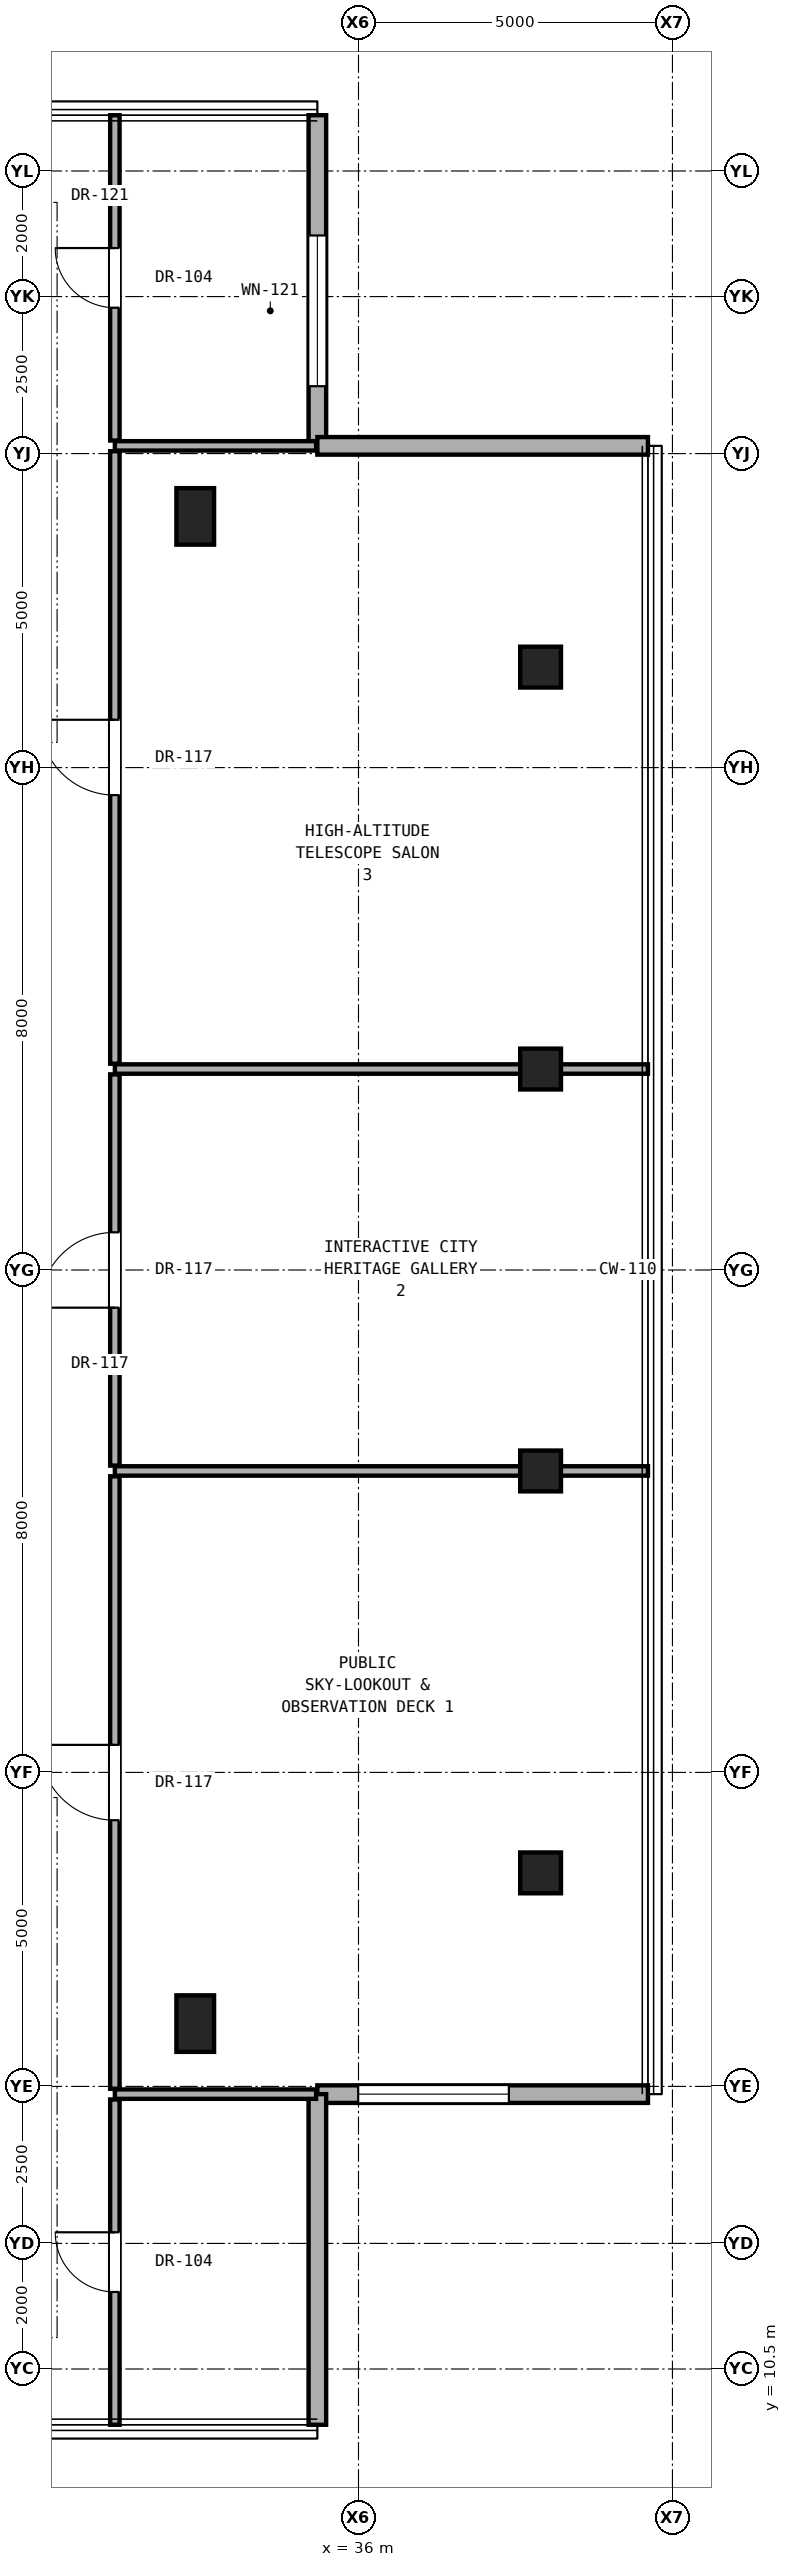
"""IFC4 building model, lengths in metres.
Left out: names, types, materials, properties, quantities, classifications, styles, units other than length and angle.
Written with IfcOpenShell. Run it as: python <this file> out.ifc"""

import sys

from ifc_helpers import new_model, si_unit, direction, frame, frame_2d, origin, origin_2d, place, context, subcontext, project, spatial, rectangle, hollow_rectangle, extrude, element, fill, save


model = new_model("IFC4")
c1 = context("Model", 3, precision=1e-05, world=origin(), true_north=direction((0.0, 1.0)))
c2 = subcontext(c1, "Body", "Model", "MODEL_VIEW")
j1 = project(units=[si_unit("LENGTHUNIT", "METRE"), si_unit("PLANEANGLEUNIT", "RADIAN")], contexts=[c1])
p1 = place(None, origin())
s1 = spatial("IfcSite", under=j1, at=p1, CompositionType="ELEMENT")
p2 = place(p1, origin())
s2 = spatial("IfcBuilding", under=s1, at=p2, CompositionType="ELEMENT")
p3 = place(p2, frame((0.0, 0.0, 252.7)))
s3 = spatial("IfcBuildingStorey", under=s2, at=p3, CompositionType="ELEMENT", Elevation=252.7)
for number, where, z_axis, x_axis in (
    (1, (38.9, 18.4, 0.0), (0.0, 0.0, 1.0), (1.0, 0.0, 0.0)),
    (2, (38.9, 24.8, 0.0), (0.0, 0.0, 1.0), (1.0, 0.0, 0.0)),
    (3, (38.9, 31.2, 0.0), (0.0, 0.0, 1.0), (1.0, 0.0, 0.0)),
    (4, (38.9, 37.6, 0.0), (0.0, 0.0, 1.0), (1.0, 0.0, 0.0)),
):
    element("IfcColumn", number, at=place(p3, frame(where, z_axis=z_axis, x_axis=x_axis)), inside=s3, PredefinedType="COLUMN", context=c2, shape_type="SweptSolid", body=[
        extrude(hollow_rectangle(XDim=0.65, YDim=0.65, WallThickness=0.036, at=origin_2d()), origin(), (0.0, 0.0, 1.0), 3.6),
    ])
for number, where, z_axis, x_axis in (
    (5, (33.4, 16.0, 0.0), (0.0, 0.0, 1.0), (1.0, 0.0, 0.0)),
    (6, (33.4, 40.0, 0.0), (0.0, 0.0, 1.0), (1.0, 0.0, 0.0)),
):
    element("IfcColumn", number, at=place(p3, frame(where, z_axis=z_axis, x_axis=x_axis)), inside=s3, PredefinedType="PILASTER", context=c2, shape_type="SweptSolid", body=[
        extrude(rectangle(XDim=0.6, YDim=0.9, at=origin_2d()), origin(), (0.0, 0.0, 1.0), 3.6),
    ])
p4 = place(p3, frame((35.345, 41.123, 0.0), z_axis=(0.0, 0.0, 1.0), x_axis=(0.0, 1.0, 0.0)))
e7 = element("IfcWall", 7, at=p4, inside=s3, PredefinedType="SOLIDWALL", context=c2, shape_type="SweptSolid", body=[
    extrude(rectangle(XDim=5.265, YDim=0.28, at=frame_2d((2.632, 0.0))), origin(), (0.0, 0.0, 1.0), 3.38),
])
p5 = place(p4, frame((0.95, 0.0, 0.85)))
e8 = element("IfcOpeningElement", 8, at=p5, cuts=e7, PredefinedType="OPENING", context=c2, shape_type="SweptSolid", body=[
    extrude(rectangle(XDim=2.4, YDim=2.35, at=frame_2d((1.2, 1.175))), frame((0.0, 0.15, 0.0), z_axis=(0.0, -1.0, 0.0), x_axis=(1.0, 0.0, 0.0)), (0.0, 0.0, 1.0), 0.3),
])
p6 = place(p3, frame((35.345, 14.877, 0.0), z_axis=(0.0, 0.0, 1.0), x_axis=(1.0, 0.0, 0.0)))
e9 = element("IfcWall", 9, at=p6, inside=s3, PredefinedType="SOLIDWALL", context=c2, shape_type="SweptSolid", body=[
    extrude(rectangle(XDim=5.265, YDim=0.28, at=frame_2d((2.633, 0.0))), origin(), (0.0, 0.0, 1.0), 3.38),
])
p7 = place(p6, frame((0.65, 0.0, 0.85)))
e10 = element("IfcOpeningElement", 10, at=p7, cuts=e9, PredefinedType="OPENING", context=c2, shape_type="SweptSolid", body=[
    extrude(rectangle(XDim=2.4, YDim=2.35, at=frame_2d((1.2, 1.175))), frame((0.0, 0.15, 0.0), z_axis=(0.0, -1.0, 0.0), x_axis=(1.0, 0.0, 0.0)), (0.0, 0.0, 1.0), 0.3),
])
p8 = place(p3, frame((35.345, 9.612, 0.0), z_axis=(0.0, 0.0, 1.0), x_axis=(0.0, 1.0, 0.0)))
e11 = element("IfcWall", 11, at=p8, inside=s3, PredefinedType="SOLIDWALL", context=c2, shape_type="SweptSolid", body=[
    extrude(rectangle(XDim=5.265, YDim=0.28, at=frame_2d((2.632, 0.0))), origin(), (0.0, 0.0, 1.0), 3.38),
])
p9 = place(p3, frame((40.61, 41.123, 0.0), z_axis=(0.0, 0.0, 1.0), x_axis=(-1.0, 0.0, 0.0)))
e12 = element("IfcWall", 12, at=p9, inside=s3, PredefinedType="SOLIDWALL", context=c2, shape_type="SweptSolid", body=[
    extrude(rectangle(XDim=5.265, YDim=0.28, at=frame_2d((2.633, 0.0))), origin(), (0.0, 0.0, 1.0), 3.38),
])
p10 = place(p3, frame((32.12, 14.877, 0.0), z_axis=(0.0, 0.0, 1.0), x_axis=(1.0, 0.0, 0.0)))
e13 = element("IfcWall", 13, at=p10, inside=s3, PredefinedType="PARTITIONING", context=c2, shape_type="SweptSolid", body=[
    extrude(rectangle(XDim=3.205, YDim=0.15, at=frame_2d((1.603, 0.0))), origin(), (0.0, 0.0, 1.0), 3.4),
])
for number, where, z_axis, x_axis in (
    (14, (32.12, 24.8, 0.0), (0.0, 0.0, 1.0), (1.0, 0.0, 0.0)),
    (15, (32.12, 31.2, 0.0), (0.0, 0.0, 1.0), (1.0, 0.0, 0.0)),
):
    element("IfcWall", number, at=place(p3, frame(where, z_axis=z_axis, x_axis=x_axis)), inside=s3, PredefinedType="PARTITIONING", context=c2, shape_type="SweptSolid", body=[
        extrude(rectangle(XDim=8.49, YDim=0.15, at=frame_2d((4.245, 0.0))), origin(), (0.0, 0.0, 1.0), 2.619),
    ])
p11 = place(p3, frame((32.12, 41.123, 0.0), z_axis=(0.0, 0.0, 1.0), x_axis=(1.0, 0.0, 0.0)))
e16 = element("IfcWall", 16, at=p11, inside=s3, PredefinedType="PARTITIONING", context=c2, shape_type="SweptSolid", body=[
    extrude(rectangle(XDim=3.205, YDim=0.15, at=frame_2d((1.603, 0.0))), origin(), (0.0, 0.0, 1.0), 3.4),
])
p12 = place(p3, frame((32.12, 9.612, 0.0), z_axis=(0.0, 0.0, 1.0), x_axis=(0.0, 1.0, 0.0)))
e17 = element("IfcWall", 17, at=p12, inside=s3, PredefinedType="PARTITIONING", context=c2, shape_type="SweptSolid", body=[
    extrude(rectangle(XDim=5.18, YDim=0.15, at=frame_2d((2.59, 0.0))), origin(), (0.0, 0.0, 1.0), 3.4),
])
p13 = place(p12, frame((2.115, 0.0, 0.0)))
e18 = element("IfcOpeningElement", 18, at=p13, cuts=e17, PredefinedType="OPENING", context=c2, shape_type="SweptSolid", body=[
    extrude(rectangle(XDim=0.95, YDim=2.15, at=frame_2d((0.475, 1.075))), frame((0.0, 0.085, 0.0), z_axis=(0.0, -1.0, 0.0), x_axis=(1.0, 0.0, 0.0)), (0.0, 0.0, 1.0), 0.17),
])
p14 = place(p3, frame((32.12, 14.962, 0.0), z_axis=(0.0, 0.0, 1.0), x_axis=(0.0, 1.0, 0.0)))
e19 = element("IfcWall", 19, at=p14, inside=s3, PredefinedType="PARTITIONING", context=c2, shape_type="SweptSolid", body=[
    extrude(rectangle(XDim=9.753, YDim=0.15, at=frame_2d((4.876, 0.0))), origin(), (0.0, 0.0, 1.0), 2.696),
])
p15 = place(p14, frame((4.277, 0.0, 0.0)))
e20 = element("IfcOpeningElement", 20, at=p15, cuts=e19, PredefinedType="OPENING", context=c2, shape_type="SweptSolid", body=[
    extrude(rectangle(XDim=1.2, YDim=2.25, at=frame_2d((0.6, 1.125))), frame((0.0, 0.085, 0.0), z_axis=(0.0, -1.0, 0.0), x_axis=(1.0, 0.0, 0.0)), (0.0, 0.0, 1.0), 0.17),
])
p16 = place(p3, frame((32.12, 24.885, 0.0), z_axis=(0.0, 0.0, 1.0), x_axis=(0.0, 1.0, 0.0)))
e21 = element("IfcWall", 21, at=p16, inside=s3, PredefinedType="PARTITIONING", context=c2, shape_type="SweptSolid", body=[
    extrude(rectangle(XDim=6.23, YDim=0.15, at=frame_2d((3.115, 0.0))), origin(), (0.0, 0.0, 1.0), 2.696),
])
p17 = place(p16, frame((2.515, 0.0, 0.0)))
e22 = element("IfcOpeningElement", 22, at=p17, cuts=e21, PredefinedType="OPENING", context=c2, shape_type="SweptSolid", body=[
    extrude(rectangle(XDim=1.2, YDim=2.25, at=frame_2d((0.6, 1.125))), frame((0.0, 0.085, 0.0), z_axis=(0.0, -1.0, 0.0), x_axis=(1.0, 0.0, 0.0)), (0.0, 0.0, 1.0), 0.17),
])
p18 = place(p3, frame((32.12, 31.285, 0.0), z_axis=(0.0, 0.0, 1.0), x_axis=(0.0, 1.0, 0.0)))
e23 = element("IfcWall", 23, at=p18, inside=s3, PredefinedType="PARTITIONING", context=c2, shape_type="SweptSolid", body=[
    extrude(rectangle(XDim=9.753, YDim=0.15, at=frame_2d((4.876, 0.0))), origin(), (0.0, 0.0, 1.0), 2.696),
])
p19 = place(p18, frame((4.277, 0.0, 0.0)))
e24 = element("IfcOpeningElement", 24, at=p19, cuts=e23, PredefinedType="OPENING", context=c2, shape_type="SweptSolid", body=[
    extrude(rectangle(XDim=1.2, YDim=2.25, at=frame_2d((0.6, 1.125))), frame((0.0, 0.085, 0.0), z_axis=(0.0, -1.0, 0.0), x_axis=(1.0, 0.0, 0.0)), (0.0, 0.0, 1.0), 0.17),
])
p20 = place(p3, frame((32.12, 41.208, 0.0), z_axis=(0.0, 0.0, 1.0), x_axis=(0.0, 1.0, 0.0)))
e25 = element("IfcWall", 25, at=p20, inside=s3, PredefinedType="PARTITIONING", context=c2, shape_type="SweptSolid", body=[
    extrude(rectangle(XDim=5.18, YDim=0.15, at=frame_2d((2.59, 0.0))), origin(), (0.0, 0.0, 1.0), 3.4),
])
p21 = place(p20, frame((2.115, 0.0, 0.0)))
e26 = element("IfcOpeningElement", 26, at=p21, cuts=e25, PredefinedType="OPENING", context=c2, shape_type="SweptSolid", body=[
    extrude(rectangle(XDim=0.95, YDim=2.15, at=frame_2d((0.475, 1.075))), frame((0.0, 0.085, 0.0), z_axis=(0.0, -1.0, 0.0), x_axis=(1.0, 0.0, 0.0)), (0.0, 0.0, 1.0), 0.17),
])
p22 = place(p5, origin())
e27 = element("IfcWindow", 27, at=p22, inside=s3, PartitioningType="SINGLE_PANEL", PredefinedType="WINDOW", context=c2, shape_type="SweptSolid", body=[
    extrude(rectangle(XDim=2.4, YDim=2.35, at=frame_2d((1.2, 1.175))), frame((0.0, 0.03, 0.0), z_axis=(0.0, -1.0, 0.0), x_axis=(1.0, 0.0, 0.0)), (0.0, 0.0, 1.0), 0.06),
])
fill(e8, e27)
p23 = place(p7, origin())
e28 = element("IfcWindow", 28, at=p23, inside=s3, PartitioningType="SINGLE_PANEL", PredefinedType="WINDOW", context=c2, shape_type="SweptSolid", body=[
    extrude(rectangle(XDim=2.4, YDim=2.35, at=frame_2d((1.2, 1.175))), frame((0.0, 0.03, 0.0), z_axis=(0.0, -1.0, 0.0), x_axis=(1.0, 0.0, 0.0)), (0.0, 0.0, 1.0), 0.06),
])
fill(e10, e28)
p24 = place(p15, origin())
e29 = element("IfcDoor", 29, at=p24, inside=s3, OperationType="SINGLE_SWING_RIGHT", PredefinedType="DOOR", context=c2, shape_type="SweptSolid", body=[
    extrude(rectangle(XDim=1.2, YDim=2.25, at=frame_2d((0.6, 1.125))), frame((0.0, 0.025, 0.0), z_axis=(0.0, -1.0, 0.0), x_axis=(1.0, 0.0, 0.0)), (0.0, 0.0, 1.0), 0.05),
])
fill(e20, e29)
p25 = place(p17, origin())
e30 = element("IfcDoor", 30, at=p25, inside=s3, OperationType="SINGLE_SWING_LEFT", PredefinedType="DOOR", context=c2, shape_type="SweptSolid", body=[
    extrude(rectangle(XDim=1.2, YDim=2.25, at=frame_2d((0.6, 1.125))), frame((0.0, 0.025, 0.0), z_axis=(0.0, -1.0, 0.0), x_axis=(1.0, 0.0, 0.0)), (0.0, 0.0, 1.0), 0.05),
])
fill(e22, e30)
p26 = place(p19, origin())
e31 = element("IfcDoor", 31, at=p26, inside=s3, OperationType="SINGLE_SWING_RIGHT", PredefinedType="DOOR", context=c2, shape_type="SweptSolid", body=[
    extrude(rectangle(XDim=1.2, YDim=2.25, at=frame_2d((0.6, 1.125))), frame((0.0, 0.025, 0.0), z_axis=(0.0, -1.0, 0.0), x_axis=(1.0, 0.0, 0.0)), (0.0, 0.0, 1.0), 0.05),
])
fill(e24, e31)
p27 = place(p13, origin())
e32 = element("IfcDoor", 32, at=p27, inside=s3, OperationType="SINGLE_SWING_RIGHT", PredefinedType="DOOR", context=c2, shape_type="SweptSolid", body=[
    extrude(rectangle(XDim=0.95, YDim=2.15, at=frame_2d((0.475, 1.075))), frame((0.0, 0.025, 0.0), z_axis=(0.0, -1.0, 0.0), x_axis=(1.0, 0.0, 0.0)), (0.0, 0.0, 1.0), 0.05),
])
fill(e18, e32)
p28 = place(p21, origin())
e33 = element("IfcDoor", 33, at=p28, inside=s3, OperationType="SINGLE_SWING_RIGHT", PredefinedType="DOOR", context=c2, shape_type="SweptSolid", body=[
    extrude(rectangle(XDim=0.95, YDim=2.15, at=frame_2d((0.475, 1.075))), frame((0.0, 0.025, 0.0), z_axis=(0.0, -1.0, 0.0), x_axis=(1.0, 0.0, 0.0)), (0.0, 0.0, 1.0), 0.05),
])
fill(e26, e33)
save(model, sys.argv[1])
